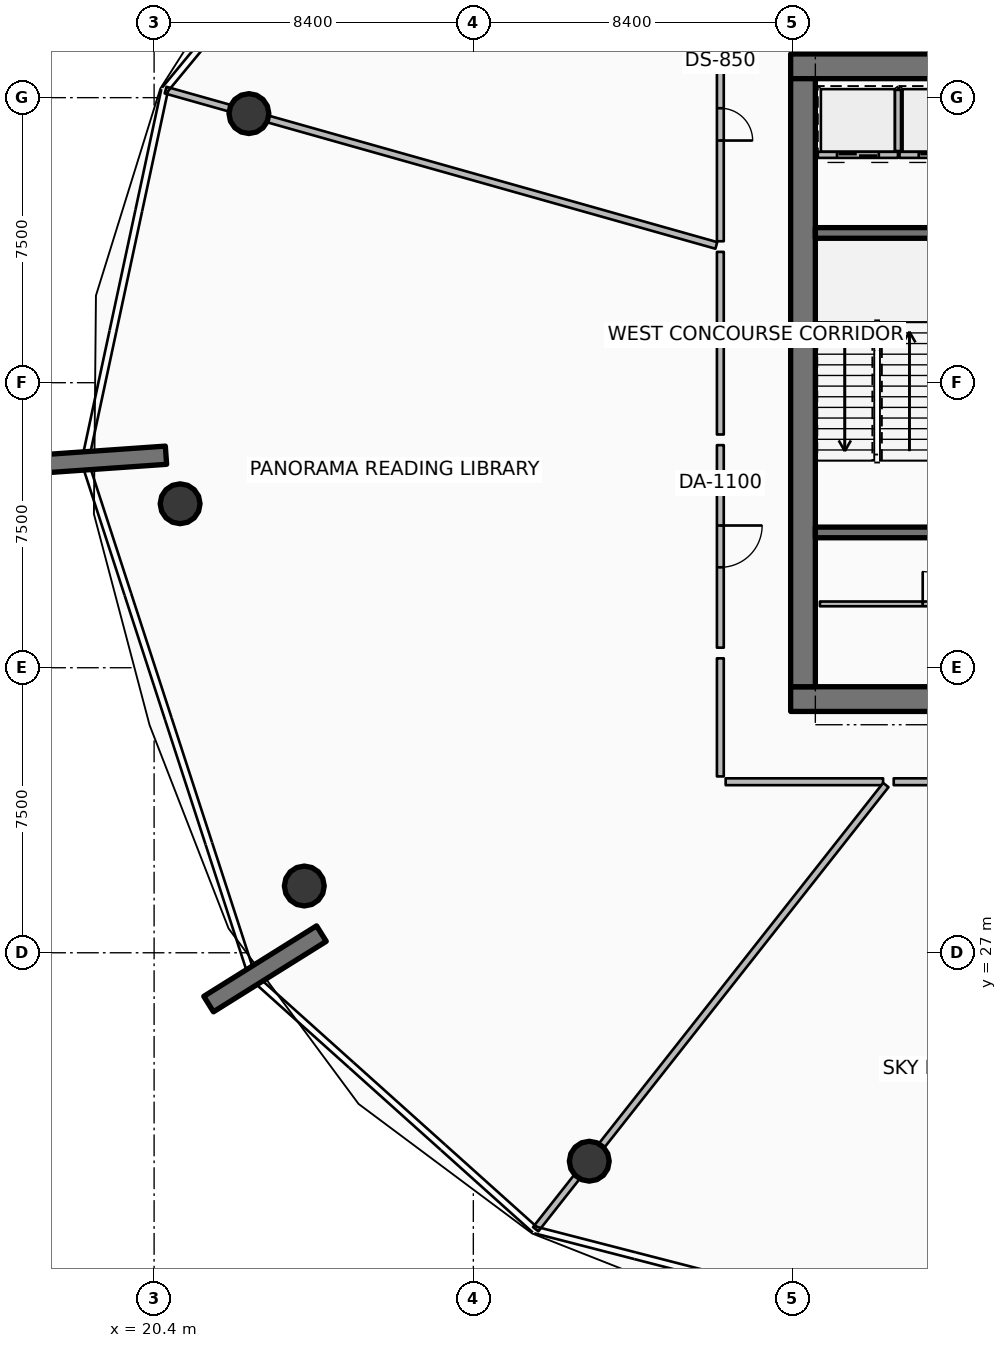
"""IFC4 building model, lengths in metres.
Left out: names, types, materials, properties, quantities, classifications, styles, units other than length and angle.
Written with IfcOpenShell. Run it as: python <this file> out.ifc"""

import sys

from ifc_helpers import new_model, si_unit, direction, frame, frame_2d, origin, origin_2d, place, context, subcontext, project, spatial, rectangle, circle, extrude, element, fill, save


model = new_model("IFC4")
c1 = context("Model", 3, precision=1e-05, world=origin(), true_north=direction((0.0, 1.0)))
c2 = subcontext(c1, "Body", "Model", "MODEL_VIEW")
j1 = project(units=[si_unit("LENGTHUNIT", "METRE"), si_unit("PLANEANGLEUNIT", "RADIAN")], contexts=[c1])
p1 = place(None, origin())
s1 = spatial("IfcSite", under=j1, at=p1, CompositionType="ELEMENT")
p2 = place(p1, origin())
s2 = spatial("IfcBuilding", under=s1, at=p2, CompositionType="ELEMENT")
p3 = place(p2, frame((0.0, 0.0, 231.9)))
s3 = spatial("IfcBuildingStorey", under=s2, at=p3, CompositionType="ELEMENT", Elevation=231.9)
for number, where, z_axis, x_axis in (
    (1, (37.15, 33.675, 0.0), (0.0, 0.0, 1.0), (1.0, 0.0, 0.0)),
    (2, (37.15, 50.325, 0.0), (0.0, 0.0, 1.0), (1.0, 0.0, 0.0)),
):
    element("IfcWall", number, at=place(p3, frame(where, z_axis=z_axis, x_axis=x_axis)), inside=s3, PredefinedType="SHEAR", context=c2, shape_type="SweptSolid", body=[
        extrude(rectangle(XDim=9.75, YDim=0.65, at=frame_2d((4.875, 0.0))), origin(), (0.0, 0.0, 1.0), 4.8),
    ])
p4 = place(p3, frame((37.475, 34.0, 0.0), z_axis=(0.0, 0.0, 1.0), x_axis=(0.0, 1.0, 0.0)))
e3 = element("IfcWall", 3, at=p4, inside=s3, PredefinedType="SHEAR", context=c2, shape_type="SweptSolid", body=[
    extrude(rectangle(XDim=16.0, YDim=0.65, at=frame_2d((8.0, 0.0))), origin(), (0.0, 0.0, 1.0), 4.8),
])
for number, where, z_axis, x_axis in (
    (4, (37.8, 38.06, 0.0), (0.0, 0.0, 1.0), (1.0, 0.0, 0.0)),
    (5, (37.8, 45.94, 0.0), (0.0, 0.0, 1.0), (1.0, 0.0, 0.0)),
):
    element("IfcWall", number, at=place(p3, frame(where, z_axis=z_axis, x_axis=x_axis)), inside=s3, PredefinedType="SHEAR", context=c2, shape_type="SweptSolid", body=[
        extrude(rectangle(XDim=3.5, YDim=0.28, at=frame_2d((1.75, 0.0))), origin(), (0.0, 0.0, 1.0), 4.8),
    ])
p5 = place(p3, frame((20.712, 40.092, 0.0), z_axis=(0.0, 0.0, 1.0), x_axis=(-0.997563824095, -0.069759707979, 0.0)))
e6 = element("IfcWall", 6, at=p5, inside=s3, PredefinedType="SOLIDWALL", context=c2, shape_type="SweptSolid", body=[
    extrude(rectangle(XDim=3.5, YDim=0.48, at=frame_2d((1.75, 0.0))), origin(), (0.0, 0.0, 1.0), 4.8),
])
p6 = place(p3, frame((24.802, 27.504, 0.0), z_axis=(0.0, 0.0, 1.0), x_axis=(-0.848084507158, -0.529860989996, 0.0)))
e7 = element("IfcWall", 7, at=p6, inside=s3, PredefinedType="SOLIDWALL", context=c2, shape_type="SweptSolid", body=[
    extrude(rectangle(XDim=3.5, YDim=0.48, at=frame_2d((1.75, 0.0))), origin(), (0.0, 0.0, 1.0), 4.8),
])
p7 = place(p3, frame((22.895, 49.08, 0.0), z_axis=(-0.2201588075, 0.062115463352, 0.973484344349), x_axis=(-0.271538679248, -0.962427527491, 0.0)))
e8 = element("IfcColumn", 8, at=p7, inside=s3, PredefinedType="COLUMN", context=c2, shape_type="SweptSolid", body=[
    extrude(circle(Radius=0.525, at=origin_2d()), origin(), (0.0, 0.0, 1.0), 4.52),
])
p8 = place(p3, frame((21.084, 38.814, 0.0), z_axis=(-0.235548638365, -0.027866967056, 0.97146295406), x_axis=(0.117487290092, -0.993074386271, 0.0)))
e9 = element("IfcColumn", 9, at=p8, inside=s3, PredefinedType="COLUMN", context=c2, shape_type="SweptSolid", body=[
    extrude(circle(Radius=0.525, at=origin_2d()), origin(), (0.0, 0.0, 1.0), 4.529),
])
p9 = place(p3, frame((24.352, 28.757, 0.0), z_axis=(-0.206979778602, -0.115887115623, 0.971457434828), x_axis=(0.4885341758, -0.872544760499, 0.0)))
e10 = element("IfcColumn", 10, at=p9, inside=s3, PredefinedType="COLUMN", context=c2, shape_type="SweptSolid", body=[
    extrude(circle(Radius=0.525, at=origin_2d()), origin(), (0.0, 0.0, 1.0), 4.53),
])
p10 = place(p3, frame((31.851, 21.515, 0.0), z_axis=(-0.141623073819, -0.179648491046, 0.97348308903), x_axis=(0.785317732316, -0.619092932692, 0.0)))
e11 = element("IfcColumn", 11, at=p10, inside=s3, PredefinedType="COLUMN", context=c2, shape_type="SweptSolid", body=[
    extrude(circle(Radius=0.525, at=origin_2d()), origin(), (0.0, 0.0, 1.0), 4.52),
])
p11 = place(p3, frame((39.975, 47.995, 0.0), z_axis=(0.0, 0.0, 1.0), x_axis=(-1.0, 0.0, 0.0)))
e12 = element("IfcWall", 12, at=p11, inside=s3, PredefinedType="PARTITIONING", context=c2, shape_type="SweptSolid", body=[
    extrude(rectangle(XDim=2.11, YDim=0.16, at=frame_2d((1.055, 0.0))), origin(), (0.0, 0.0, 1.0), 4.4),
])
p12 = place(p11, frame((0.505, 0.0, 0.0)))
e13 = element("IfcOpeningElement", 13, at=p12, cuts=e12, PredefinedType="OPENING", context=c2, shape_type="SweptSolid", body=[
    extrude(rectangle(XDim=1.1, YDim=2.1, at=frame_2d((0.55, 1.05))), frame((0.0, 0.09, 0.0), z_axis=(0.0, -1.0, 0.0), x_axis=(1.0, 0.0, 0.0)), (0.0, 0.0, 1.0), 0.18),
])
p13 = place(p3, frame((39.975, 48.095, 0.0), z_axis=(0.0, 0.0, 1.0), x_axis=(0.0, 1.0, 0.0)))
e14 = element("IfcWall", 14, at=p13, inside=s3, PredefinedType="PARTITIONING", context=c2, shape_type="SweptSolid", body=[
    extrude(rectangle(XDim=1.61, YDim=0.16, at=frame_2d((0.805, 0.0))), origin(), (0.0, 0.0, 1.0), 4.4),
])
p14 = place(p3, frame((42.125, 47.995, 0.0), z_axis=(0.0, 0.0, 1.0), x_axis=(-1.0, 0.0, 0.0)))
e15 = element("IfcWall", 15, at=p14, inside=s3, PredefinedType="PARTITIONING", context=c2, shape_type="SweptSolid", body=[
    extrude(rectangle(XDim=2.11, YDim=0.16, at=frame_2d((1.055, 0.0))), origin(), (0.0, 0.0, 1.0), 4.4),
])
p15 = place(p14, frame((0.505, 0.0, 0.0)))
e16 = element("IfcOpeningElement", 16, at=p15, cuts=e15, PredefinedType="OPENING", context=c2, shape_type="SweptSolid", body=[
    extrude(rectangle(XDim=1.1, YDim=2.1, at=frame_2d((0.55, 1.05))), frame((0.0, 0.09, 0.0), z_axis=(0.0, -1.0, 0.0), x_axis=(1.0, 0.0, 0.0)), (0.0, 0.0, 1.0), 0.18),
])
p16 = place(p3, frame((37.92, 36.18, 0.0), z_axis=(0.0, 0.0, 1.0), x_axis=(1.0, 0.0, 0.0)))
e17 = element("IfcWall", 17, at=p16, inside=s3, PredefinedType="PARTITIONING", context=c2, shape_type="SweptSolid", body=[
    extrude(rectangle(XDim=6.26, YDim=0.125, at=frame_2d((3.13, 0.0))), origin(), (0.0, 0.0, 1.0), 3.84),
])
p17 = place(p16, frame((2.705, 0.0, 0.0)))
e18 = element("IfcOpeningElement", 18, at=p17, cuts=e17, PredefinedType="OPENING", context=c2, shape_type="SweptSolid", body=[
    extrude(rectangle(XDim=0.85, YDim=2.06, at=frame_2d((0.425, 1.03))), frame((0.0, 0.073, 0.0), z_axis=(0.0, -1.0, 0.0), x_axis=(1.0, 0.0, 0.0)), (0.0, 0.0, 1.0), 0.145),
])
p18 = place(p3, frame((35.3, 51.872, 0.0), z_axis=(0.0, 0.0, 1.0), x_axis=(0.0, -1.0, 0.0)))
e19 = element("IfcWall", 19, at=p18, inside=s3, PredefinedType="PARTITIONING", context=c2, shape_type="SweptSolid", body=[
    extrude(rectangle(XDim=6.15, YDim=0.18, at=frame_2d((3.075, 0.0))), origin(), (0.0, 0.0, 1.0), 3.357),
])
p19 = place(p18, frame((2.65, 0.0, 0.0)))
e20 = element("IfcOpeningElement", 20, at=p19, cuts=e19, PredefinedType="OPENING", context=c2, shape_type="SweptSolid", body=[
    extrude(rectangle(XDim=0.85, YDim=2.06, at=frame_2d((0.425, 1.03))), frame((0.0, 0.1, 0.0), z_axis=(0.0, -1.0, 0.0), x_axis=(1.0, 0.0, 0.0)), (0.0, 0.0, 1.0), 0.2),
])
p20 = place(p3, frame((35.194, 45.612, 0.0), z_axis=(0.0, 0.0, 1.0), x_axis=(-0.962460537185, 0.271421654186, 0.0)))
e21 = element("IfcWall", 21, at=p20, inside=s3, PredefinedType="PARTITIONING", context=c2, shape_type="SweptSolid", body=[
    extrude(rectangle(XDim=15.057, YDim=0.18, at=frame_2d((7.529, 0.0))), origin(), (0.0, 0.0, 1.0), 3.357),
])
p21 = place(p3, frame((35.3, 45.442, 0.0), z_axis=(0.0, 0.0, 1.0), x_axis=(0.0, -1.0, 0.0)))
e22 = element("IfcWall", 22, at=p21, inside=s3, PredefinedType="PARTITIONING", context=c2, shape_type="SweptSolid", body=[
    extrude(rectangle(XDim=4.805, YDim=0.18, at=frame_2d((2.402, 0.0))), origin(), (0.0, 0.0, 1.0), 3.357),
])
p22 = place(p3, frame((35.3, 40.357, 0.0), z_axis=(0.0, 0.0, 1.0), x_axis=(0.0, -1.0, 0.0)))
e23 = element("IfcWall", 23, at=p22, inside=s3, PredefinedType="PARTITIONING", context=c2, shape_type="SweptSolid", body=[
    extrude(rectangle(XDim=5.329, YDim=0.18, at=frame_2d((2.665, 0.0))), origin(), (0.0, 0.0, 1.0), 3.357),
])
p23 = place(p22, frame((2.115, 0.0, 0.0)))
e24 = element("IfcOpeningElement", 24, at=p23, cuts=e23, PredefinedType="OPENING", context=c2, shape_type="SweptSolid", body=[
    extrude(rectangle(XDim=1.1, YDim=2.1, at=frame_2d((0.55, 1.05))), frame((0.0, 0.1, 0.0), z_axis=(0.0, -1.0, 0.0), x_axis=(1.0, 0.0, 0.0)), (0.0, 0.0, 1.0), 0.2),
])
p24 = place(p3, frame((35.3, 34.748, 0.0), z_axis=(0.0, 0.0, 1.0), x_axis=(0.0, -1.0, 0.0)))
e25 = element("IfcWall", 25, at=p24, inside=s3, PredefinedType="PARTITIONING", context=c2, shape_type="SweptSolid", body=[
    extrude(rectangle(XDim=3.108, YDim=0.18, at=frame_2d((1.554, 0.0))), origin(), (0.0, 0.0, 1.0), 3.357),
])
p25 = place(p3, frame((35.44, 31.5, 0.0), z_axis=(0.0, 0.0, 1.0), x_axis=(1.0, 0.0, 0.0)))
e26 = element("IfcWall", 26, at=p25, inside=s3, PredefinedType="PARTITIONING", context=c2, shape_type="SweptSolid", body=[
    extrude(rectangle(XDim=4.143, YDim=0.18, at=frame_2d((2.071, 0.0))), origin(), (0.0, 0.0, 1.0), 3.357),
])
p26 = place(p3, frame((39.654, 31.414, 0.0), z_axis=(0.0, 0.0, 1.0), x_axis=(-0.619091503037, -0.78531885936, 0.0)))
e27 = element("IfcWall", 27, at=p26, inside=s3, PredefinedType="PARTITIONING", context=c2, shape_type="SweptSolid", body=[
    extrude(rectangle(XDim=14.883, YDim=0.18, at=frame_2d((7.441, 0.0))), origin(), (0.0, 0.0, 1.0), 3.357),
])
p27 = place(p3, frame((39.863, 31.5, 0.0), z_axis=(0.0, 0.0, 1.0), x_axis=(1.0, 0.0, 0.0)))
e28 = element("IfcWall", 28, at=p27, inside=s3, PredefinedType="PARTITIONING", context=c2, shape_type="SweptSolid", body=[
    extrude(rectangle(XDim=5.036, YDim=0.18, at=frame_2d((2.518, 0.0))), origin(), (0.0, 0.0, 1.0), 3.357),
])
p28 = place(p27, frame((1.968, 0.0, 0.0)))
e29 = element("IfcOpeningElement", 29, at=p28, cuts=e28, PredefinedType="OPENING", context=c2, shape_type="SweptSolid", body=[
    extrude(rectangle(XDim=1.1, YDim=2.1, at=frame_2d((0.55, 1.05))), frame((0.0, 0.1, 0.0), z_axis=(0.0, -1.0, 0.0), x_axis=(1.0, 0.0, 0.0)), (0.0, 0.0, 1.0), 0.2),
])
p29 = place(p12, origin())
e30 = element("IfcDoor", 30, at=p29, inside=s3, OperationType="DOUBLE_DOOR_SLIDING", PredefinedType="DOOR", context=c2, shape_type="SweptSolid", body=[
    extrude(rectangle(XDim=1.1, YDim=2.1, at=frame_2d((0.55, 1.05))), frame((0.0, 0.025, 0.0), z_axis=(0.0, -1.0, 0.0), x_axis=(1.0, 0.0, 0.0)), (0.0, 0.0, 1.0), 0.05),
])
fill(e13, e30)
p30 = place(p15, origin())
e31 = element("IfcDoor", 31, at=p30, inside=s3, OperationType="DOUBLE_DOOR_SLIDING", PredefinedType="DOOR", context=c2, shape_type="SweptSolid", body=[
    extrude(rectangle(XDim=1.1, YDim=2.1, at=frame_2d((0.55, 1.05))), frame((0.0, 0.025, 0.0), z_axis=(0.0, -1.0, 0.0), x_axis=(1.0, 0.0, 0.0)), (0.0, 0.0, 1.0), 0.05),
])
fill(e16, e31)
p31 = place(p17, origin())
e32 = element("IfcDoor", 32, at=p31, inside=s3, OperationType="SINGLE_SWING_LEFT", PredefinedType="DOOR", context=c2, shape_type="SweptSolid", body=[
    extrude(rectangle(XDim=0.85, YDim=2.06, at=frame_2d((0.425, 1.03))), frame((0.0, 0.025, 0.0), z_axis=(0.0, -1.0, 0.0), x_axis=(1.0, 0.0, 0.0)), (0.0, 0.0, 1.0), 0.05),
])
fill(e18, e32)
p32 = place(p19, origin())
e33 = element("IfcDoor", 33, at=p32, inside=s3, OperationType="SINGLE_SWING_RIGHT", PredefinedType="DOOR", context=c2, shape_type="SweptSolid", body=[
    extrude(rectangle(XDim=0.85, YDim=2.06, at=frame_2d((0.425, 1.03))), frame((0.0, 0.025, 0.0), z_axis=(0.0, -1.0, 0.0), x_axis=(1.0, 0.0, 0.0)), (0.0, 0.0, 1.0), 0.05),
])
fill(e20, e33)
p33 = place(p23, origin())
e34 = element("IfcDoor", 34, at=p33, inside=s3, OperationType="SINGLE_SWING_LEFT", PredefinedType="DOOR", context=c2, shape_type="SweptSolid", body=[
    extrude(rectangle(XDim=1.1, YDim=2.1, at=frame_2d((0.55, 1.05))), frame((0.0, 0.025, 0.0), z_axis=(0.0, -1.0, 0.0), x_axis=(1.0, 0.0, 0.0)), (0.0, 0.0, 1.0), 0.05),
])
fill(e24, e34)
save(model, sys.argv[1])
